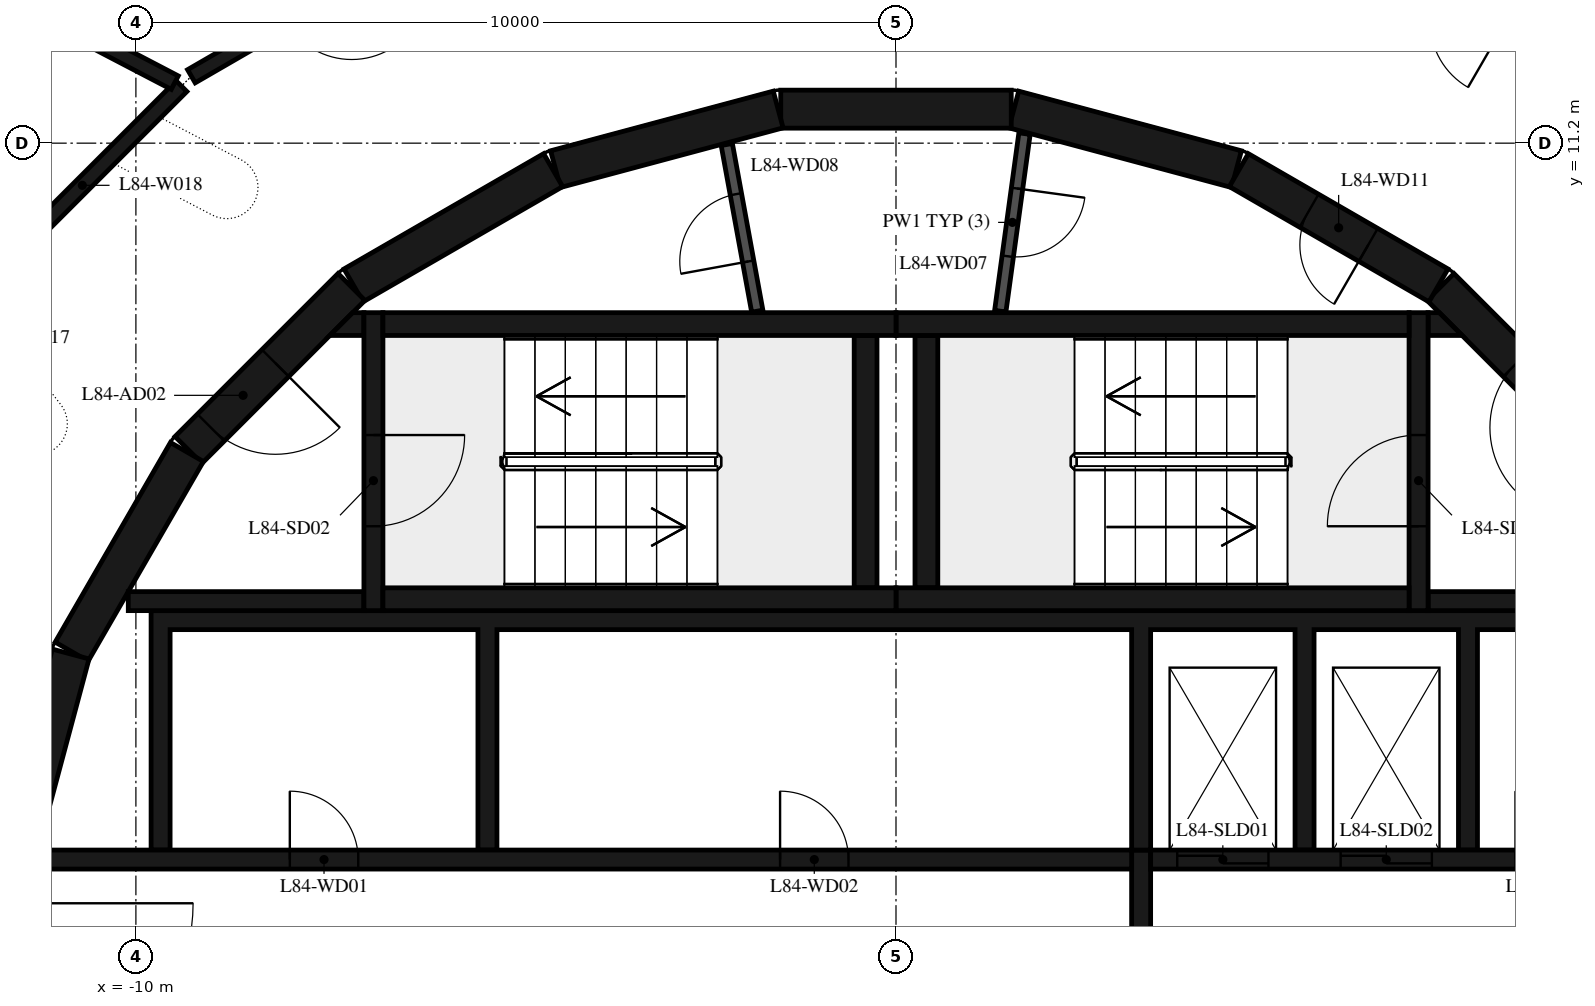
"""IFC4 building model, lengths in metres.
Left out: names, types, materials, properties, quantities, classifications, styles, units other than length and angle.
Written with IfcOpenShell. Run it as: python <this file> out.ifc"""

import sys

from ifc_helpers import new_model, si_unit, direction, frame, frame_2d, origin, place, context, subcontext, project, spatial, polyline, rectangle, outline, extrude, element, fill, save


model = new_model("IFC4")
c1 = context("Model", 3, precision=1e-05, world=origin(), true_north=direction((0.0, 1.0)))
c2 = subcontext(c1, "Body", "Model", "MODEL_VIEW")
j1 = project(units=[si_unit("LENGTHUNIT", "METRE"), si_unit("PLANEANGLEUNIT", "RADIAN")], contexts=[c1])
p1 = place(None, origin())
s1 = spatial("IfcSite", under=j1, at=p1, CompositionType="ELEMENT")
p2 = place(p1, origin())
s2 = spatial("IfcBuilding", under=s1, at=p2, CompositionType="ELEMENT")
p3 = place(p2, frame((0.0, 0.0, 326.2)))
s3 = spatial("IfcBuildingStorey", under=s2, at=p3, CompositionType="ELEMENT", Elevation=326.2)
p4 = place(p3, frame((9.308, 7.164, 0.0), z_axis=(0.0, 0.0, 1.0), x_axis=(-0.707106781187, 0.707106781187, 0.0)))
e1 = element("IfcWall", 1, at=p4, inside=s3, PredefinedType="SHEAR", context=c2, shape_type="SweptSolid", body=[
    extrude(rectangle(XDim=3.032, YDim=0.5, at=frame_2d((1.516, 0.0))), origin(), (0.0, 0.0, 1.0), 6.35),
])
p5 = place(p4, frame((0.416, 0.0, 0.0)))
e2 = element("IfcOpeningElement", 2, at=p5, cuts=e1, PredefinedType="OPENING", context=c2, shape_type="SweptSolid", body=[
    extrude(rectangle(XDim=1.2, YDim=2.1, at=frame_2d((0.6, 1.05))), frame((0.0, 0.26, 0.0), z_axis=(0.0, -1.0, 0.0), x_axis=(1.0, 0.0, 0.0)), (0.0, 0.0, 1.0), 0.52),
])
p6 = place(p3, frame((7.137, 9.329, 0.0), z_axis=(0.0, 0.0, 1.0), x_axis=(-0.865975092491, 0.500087131594, 0.0)))
e3 = element("IfcWall", 3, at=p6, inside=s3, PredefinedType="SHEAR", context=c2, shape_type="SweptSolid", body=[
    extrude(rectangle(XDim=3.033, YDim=0.5, at=frame_2d((1.516, 0.0))), origin(), (0.0, 0.0, 1.0), 6.35),
])
p7 = place(p6, frame((1.066, 0.0, 0.0)))
e4 = element("IfcOpeningElement", 4, at=p7, cuts=e3, PredefinedType="OPENING", context=c2, shape_type="SweptSolid", body=[
    extrude(rectangle(XDim=0.9, YDim=2.1, at=frame_2d((0.45, 1.05))), frame((0.0, 0.26, 0.0), z_axis=(0.0, -1.0, 0.0), x_axis=(1.0, 0.0, 0.0)), (0.0, 0.0, 1.0), 0.52),
])
for number, where, z_axis, x_axis in (
    (5, (4.479, 10.858, 0.0), (0.0, 0.0, 1.0), (-0.966, 0.259, 0.0)),
    (6, (1.516, 11.647, 0.0), (0.0, 0.0, 1.0), (-1.0, 0.0, 0.0)),
    (7, (-1.55, 11.643, 0.0), (0.0, 0.0, 1.0), (-0.966, -0.259, 0.0)),
    (8, (-4.51, 10.845, 0.0), (0.0, 0.0, 1.0), (-0.866, -0.5, 0.0)),
):
    element("IfcWall", number, at=place(p3, frame(where, z_axis=z_axis, x_axis=x_axis)), inside=s3, PredefinedType="SHEAR", context=c2, shape_type="SweptSolid", body=[
        extrude(rectangle(XDim=3.033, YDim=0.5, at=frame_2d((1.516, 0.0))), origin(), (0.0, 0.0, 1.0), 6.35),
    ])
p8 = place(p3, frame((-7.164, 9.308, 0.0), z_axis=(0.0, 0.0, 1.0), x_axis=(-0.707106781187, -0.707106781187, 0.0)))
e9 = element("IfcWall", 9, at=p8, inside=s3, PredefinedType="SHEAR", context=c2, shape_type="SweptSolid", body=[
    extrude(rectangle(XDim=3.032, YDim=0.5, at=frame_2d((1.516, 0.0))), origin(), (0.0, 0.0, 1.0), 6.35),
])
p9 = place(p8, frame((1.416, 0.0, 0.0)))
e10 = element("IfcOpeningElement", 10, at=p9, cuts=e9, PredefinedType="OPENING", context=c2, shape_type="SweptSolid", body=[
    extrude(rectangle(XDim=1.2, YDim=2.1, at=frame_2d((0.6, 1.05))), frame((0.0, 0.26, 0.0), z_axis=(0.0, -1.0, 0.0), x_axis=(1.0, 0.0, 0.0)), (0.0, 0.0, 1.0), 0.52),
])
for number, where, z_axis, x_axis in (
    (11, (-9.329, 7.137, 0.0), (0.0, 0.0, 1.0), (-0.5, -0.866, 0.0)),
    (12, (-10.858, 4.479, 0.0), (0.0, 0.0, 1.0), (-0.259, -0.966, 0.0)),
):
    element("IfcWall", number, at=place(p3, frame(where, z_axis=z_axis, x_axis=x_axis)), inside=s3, PredefinedType="SHEAR", context=c2, shape_type="SweptSolid", body=[
        extrude(rectangle(XDim=3.033, YDim=0.5, at=frame_2d((1.516, 0.0))), origin(), (0.0, 0.0, 1.0), 6.35),
    ])
for number, where, z_axis, x_axis in (
    (13, (0.0, 5.2, 0.0), (0.0, 0.0, 1.0), (1.0, 0.0, 0.0)),
    (14, (0.0, 8.82, 0.0), (0.0, 0.0, 1.0), (1.0, 0.0, 0.0)),
):
    element("IfcWall", number, at=place(p3, frame(where, z_axis=z_axis, x_axis=x_axis)), inside=s3, PredefinedType="SHEAR", context=c2, shape_type="SweptSolid", body=[
        extrude(rectangle(XDim=6.75, YDim=0.3, at=frame_2d((3.375, 0.0))), origin(), (0.0, 0.0, 1.0), 6.35),
    ])
p10 = place(p3, frame((0.4, 5.35, 0.0), z_axis=(0.0, 0.0, 1.0), x_axis=(0.0, 1.0, 0.0)))
e15 = element("IfcWall", 15, at=p10, inside=s3, PredefinedType="SHEAR", context=c2, shape_type="SweptSolid", body=[
    extrude(rectangle(XDim=3.32, YDim=0.3, at=frame_2d((1.66, 0.0))), origin(), (0.0, 0.0, 1.0), 6.35),
])
p11 = place(p3, frame((6.875, 5.05, 0.0), z_axis=(0.0, 0.0, 1.0), x_axis=(0.0, 1.0, 0.0)))
e16 = element("IfcWall", 16, at=p11, inside=s3, PredefinedType="SHEAR", context=c2, shape_type="SweptSolid", body=[
    extrude(rectangle(XDim=3.92, YDim=0.25, at=frame_2d((1.96, 0.0))), origin(), (0.0, 0.0, 1.0), 6.35),
])
p12 = place(p11, frame((1.11, 0.0, 0.0)))
e17 = element("IfcOpeningElement", 17, at=p12, cuts=e16, PredefinedType="OPENING", context=c2, shape_type="SweptSolid", body=[
    extrude(rectangle(XDim=1.2, YDim=2.1, at=frame_2d((0.6, 1.05))), frame((0.0, 0.135, 0.0), z_axis=(0.0, -1.0, 0.0), x_axis=(1.0, 0.0, 0.0)), (0.0, 0.0, 1.0), 0.27),
])
p13 = place(p3, frame((7.0, 5.175, 0.0), z_axis=(0.0, 0.0, 1.0), x_axis=(1.0, 0.0, 0.0)))
e18 = element("IfcWall", 18, at=p13, inside=s3, PredefinedType="SHEAR", context=c2, shape_type="SweptSolid", body=[
    extrude(rectangle(XDim=3.1, YDim=0.25, at=frame_2d((1.55, 0.0))), origin(), (0.0, 0.0, 1.0), 6.35),
])
p14 = place(p3, origin())
e19 = element("IfcWall", 19, at=p14, inside=s3, PredefinedType="SHEAR", context=c2, shape_type="SweptSolid", body=[
    extrude(outline(polyline([(7.448, 8.67), (7.0, 8.67), (7.0, 8.97), (7.148, 8.97), (7.448, 8.67)])), origin(), (0.0, 0.0, 1.0), 6.35),
])
for number, where, z_axis, x_axis in (
    (20, (-6.75, 5.2, 0.0), (0.0, 0.0, 1.0), (1.0, 0.0, 0.0)),
    (21, (-6.75, 8.82, 0.0), (0.0, 0.0, 1.0), (1.0, 0.0, 0.0)),
):
    element("IfcWall", number, at=place(p3, frame(where, z_axis=z_axis, x_axis=x_axis)), inside=s3, PredefinedType="SHEAR", context=c2, shape_type="SweptSolid", body=[
        extrude(rectangle(XDim=6.75, YDim=0.3, at=frame_2d((3.375, 0.0))), origin(), (0.0, 0.0, 1.0), 6.35),
    ])
p15 = place(p3, frame((-0.4, 5.35, 0.0), z_axis=(0.0, 0.0, 1.0), x_axis=(0.0, 1.0, 0.0)))
e22 = element("IfcWall", 22, at=p15, inside=s3, PredefinedType="SHEAR", context=c2, shape_type="SweptSolid", body=[
    extrude(rectangle(XDim=3.32, YDim=0.3, at=frame_2d((1.66, 0.0))), origin(), (0.0, 0.0, 1.0), 6.35),
])
p16 = place(p3, frame((-6.875, 8.97, 0.0), z_axis=(0.0, 0.0, 1.0), x_axis=(0.0, -1.0, 0.0)))
e23 = element("IfcWall", 23, at=p16, inside=s3, PredefinedType="SHEAR", context=c2, shape_type="SweptSolid", body=[
    extrude(rectangle(XDim=3.92, YDim=0.25, at=frame_2d((1.96, 0.0))), origin(), (0.0, 0.0, 1.0), 6.35),
])
p17 = place(p16, frame((1.61, 0.0, 0.0)))
e24 = element("IfcOpeningElement", 24, at=p17, cuts=e23, PredefinedType="OPENING", context=c2, shape_type="SweptSolid", body=[
    extrude(rectangle(XDim=1.2, YDim=2.1, at=frame_2d((0.6, 1.05))), frame((0.0, 0.135, 0.0), z_axis=(0.0, -1.0, 0.0), x_axis=(1.0, 0.0, 0.0)), (0.0, 0.0, 1.0), 0.27),
])
p18 = place(p3, frame((-7.0, 5.175, 0.0), z_axis=(0.0, 0.0, 1.0), x_axis=(-1.0, 0.0, 0.0)))
e25 = element("IfcWall", 25, at=p18, inside=s3, PredefinedType="SHEAR", context=c2, shape_type="SweptSolid", body=[
    extrude(rectangle(XDim=3.1, YDim=0.25, at=frame_2d((1.55, 0.0))), origin(), (0.0, 0.0, 1.0), 6.35),
])
p19 = place(p3, origin())
e26 = element("IfcWall", 26, at=p19, inside=s3, PredefinedType="SHEAR", context=c2, shape_type="SweptSolid", body=[
    extrude(outline(polyline([(-7.148, 8.97), (-7.0, 8.97), (-7.0, 8.67), (-7.448, 8.67), (-7.148, 8.97)])), origin(), (0.0, 0.0, 1.0), 6.35),
])
p20 = place(p3, origin())
e27 = element("IfcWall", 27, at=p20, inside=s3, PredefinedType="SHEAR", context=c2, shape_type="SweptSolid", body=[
    extrude(outline(polyline([(-9.8, 1.9), (-9.55, 1.9), (-9.55, 4.8), (-5.5, 4.8), (-5.5, 1.9), (-5.25, 1.9), (-5.25, 4.8), (3.1, 4.8), (3.1, 1.9), (3.35, 1.9), (3.35, 4.8), (5.25, 4.8), (5.25, 1.9), (5.5, 1.9), (5.5, 4.8), (7.4, 4.8), (7.4, 1.9), (7.65, 1.9), (7.65, 4.8), (9.55, 4.8), (9.55, 1.9), (9.8, 1.9), (9.8, 4.8), (9.8, 5.05), (-9.8, 5.05), (-9.8, 4.8), (-9.8, 1.9)])), origin(), (0.0, 0.0, 1.0), 6.35),
])
p21 = place(p3, frame((-11.28, 1.775, 0.0), z_axis=(0.0, 0.0, 1.0), x_axis=(1.0, 0.0, 0.0)))
e28 = element("IfcWall", 28, at=p21, inside=s3, PredefinedType="SHEAR", context=c2, shape_type="SweptSolid", body=[
    extrude(rectangle(XDim=14.38, YDim=0.25, at=frame_2d((7.19, 0.0))), origin(), (0.0, 0.0, 1.0), 6.35),
])
p22 = place(p21, frame((3.305, 0.0, 0.0)))
e29 = element("IfcOpeningElement", 29, at=p22, cuts=e28, PredefinedType="OPENING", context=c2, shape_type="SweptSolid", body=[
    extrude(rectangle(XDim=0.9, YDim=2.1, at=frame_2d((0.45, 1.05))), frame((0.0, 0.135, 0.0), z_axis=(0.0, -1.0, 0.0), x_axis=(1.0, 0.0, 0.0)), (0.0, 0.0, 1.0), 0.27),
])
p23 = place(p21, frame((9.755, 0.0, 0.0)))
e30 = element("IfcOpeningElement", 30, at=p23, cuts=e28, PredefinedType="OPENING", context=c2, shape_type="SweptSolid", body=[
    extrude(rectangle(XDim=0.9, YDim=2.1, at=frame_2d((0.45, 1.05))), frame((0.0, 0.135, 0.0), z_axis=(0.0, -1.0, 0.0), x_axis=(1.0, 0.0, 0.0)), (0.0, 0.0, 1.0), 0.27),
])
p24 = place(p3, frame((3.35, 1.775, 0.0), z_axis=(0.0, 0.0, 1.0), x_axis=(1.0, 0.0, 0.0)))
e31 = element("IfcWall", 31, at=p24, inside=s3, PredefinedType="SHEAR", context=c2, shape_type="SweptSolid", body=[
    extrude(rectangle(XDim=7.93, YDim=0.25, at=frame_2d((3.965, 0.0))), origin(), (0.0, 0.0, 1.0), 6.35),
])
p25 = place(p24, frame((0.35, 0.0, 0.0)))
e32 = element("IfcOpeningElement", 32, at=p25, cuts=e31, PredefinedType="OPENING", context=c2, shape_type="SweptSolid", body=[
    extrude(rectangle(XDim=1.2, YDim=2.4, at=frame_2d((0.6, 1.2))), frame((0.0, 0.135, 0.0), z_axis=(0.0, -1.0, 0.0), x_axis=(1.0, 0.0, 0.0)), (0.0, 0.0, 1.0), 0.27),
])
p26 = place(p24, frame((2.5, 0.0, 0.0)))
e33 = element("IfcOpeningElement", 33, at=p26, cuts=e31, PredefinedType="OPENING", context=c2, shape_type="SweptSolid", body=[
    extrude(rectangle(XDim=1.2, YDim=2.4, at=frame_2d((0.6, 1.2))), frame((0.0, 0.135, 0.0), z_axis=(0.0, -1.0, 0.0), x_axis=(1.0, 0.0, 0.0)), (0.0, 0.0, 1.0), 0.27),
])
p27 = place(p24, frame((4.8, 0.0, 0.0)))
e34 = element("IfcOpeningElement", 34, at=p27, cuts=e31, PredefinedType="OPENING", context=c2, shape_type="SweptSolid", body=[
    extrude(rectangle(XDim=0.9, YDim=2.1, at=frame_2d((0.45, 1.05))), frame((0.0, 0.135, 0.0), z_axis=(0.0, -1.0, 0.0), x_axis=(1.0, 0.0, 0.0)), (0.0, 0.0, 1.0), 0.27),
])
p28 = place(p3, frame((3.225, -1.9, 0.0), z_axis=(0.0, 0.0, 1.0), x_axis=(0.0, 1.0, 0.0)))
e35 = element("IfcWall", 35, at=p28, inside=s3, PredefinedType="SHEAR", context=c2, shape_type="SweptSolid", body=[
    extrude(rectangle(XDim=3.8, YDim=0.25, at=frame_2d((1.9, 0.0))), origin(), (0.0, 0.0, 1.0), 6.35),
])
p29 = place(p3, frame((1.691, 11.326, 0.0), z_axis=(0.0, 0.0, 1.0), x_axis=(-0.135344253201, -0.990798633994, 0.0)))
e36 = element("IfcWall", 36, at=p29, inside=s3, PredefinedType="PARTITIONING", context=c2, shape_type="SweptSolid", body=[
    extrude(rectangle(XDim=2.358, YDim=0.15, at=frame_2d((1.179, 0.0))), origin(), (0.0, 0.0, 1.0), 6.35),
])
p30 = place(p29, frame((0.729, 0.0, 0.0)))
e37 = element("IfcOpeningElement", 37, at=p30, cuts=e36, PredefinedType="OPENING", context=c2, shape_type="SweptSolid", body=[
    extrude(rectangle(XDim=0.9, YDim=2.1, at=frame_2d((0.45, 1.05))), frame((0.0, 0.085, 0.0), z_axis=(0.0, -1.0, 0.0), x_axis=(1.0, 0.0, 0.0)), (0.0, 0.0, 1.0), 0.17),
])
p31 = place(p3, frame((-1.825, 8.99, 0.0), z_axis=(0.0, 0.0, 1.0), x_axis=(-0.179955206115, 0.983674805915, 0.0)))
e38 = element("IfcWall", 38, at=p31, inside=s3, PredefinedType="PARTITIONING", context=c2, shape_type="SweptSolid", body=[
    extrude(rectangle(XDim=2.229, YDim=0.15, at=frame_2d((1.115, 0.0))), origin(), (0.0, 0.0, 1.0), 6.35),
])
p32 = place(p31, frame((0.665, 0.0, 0.0)))
e39 = element("IfcOpeningElement", 39, at=p32, cuts=e38, PredefinedType="OPENING", context=c2, shape_type="SweptSolid", body=[
    extrude(rectangle(XDim=0.9, YDim=2.1, at=frame_2d((0.45, 1.05))), frame((0.0, 0.085, 0.0), z_axis=(0.0, -1.0, 0.0), x_axis=(1.0, 0.0, 0.0)), (0.0, 0.0, 1.0), 0.17),
])
p33 = place(p3, frame((-12.009, 9.341, 0.0), z_axis=(0.0, 0.0, 1.0), x_axis=(0.707139861432, 0.707073699394, 0.0)))
e40 = element("IfcWall", 40, at=p33, inside=s3, PredefinedType="PARTITIONING", context=c2, shape_type="SweptSolid", body=[
    extrude(rectangle(XDim=3.69, YDim=0.2, at=frame_2d((1.845, 0.0))), origin(), (0.0, 0.0, 1.0), 6.35),
])
p34 = place(p3, frame((-9.489, 11.996, 0.0), z_axis=(0.0, 0.0, 1.0), x_axis=(-0.886536984928, 0.462657729163, 0.0)))
e41 = element("IfcWall", 41, at=p34, inside=s3, PredefinedType="PARTITIONING", context=c2, shape_type="SweptSolid", body=[
    extrude(rectangle(XDim=2.638, YDim=0.2, at=frame_2d((1.319, 0.0))), origin(), (0.0, 0.0, 1.0), 6.35),
])
p35 = place(p3, frame((-5.917, 14.02, 0.0), z_axis=(0.0, 0.0, 1.0), x_axis=(-0.865601686425, -0.500733182901, 0.0)))
e42 = element("IfcWall", 42, at=p35, inside=s3, PredefinedType="PARTITIONING", context=c2, shape_type="SweptSolid", body=[
    extrude(rectangle(XDim=3.874, YDim=0.2, at=frame_2d((1.937, 0.0))), origin(), (0.0, 0.0, 1.0), 6.35),
])
p36 = place(p35, frame((1.437, 0.0, 0.0)))
e43 = element("IfcOpeningElement", 43, at=p36, cuts=e42, PredefinedType="OPENING", context=c2, shape_type="SweptSolid", body=[
    extrude(rectangle(XDim=1.0, YDim=2.1, at=frame_2d((0.5, 1.05))), frame((0.0, 0.11, 0.0), z_axis=(0.0, -1.0, 0.0), x_axis=(1.0, 0.0, 0.0)), (0.0, 0.0, 1.0), 0.22),
])
p37 = place(p3, frame((9.27, 12.08, 0.0), z_axis=(0.0, 0.0, 1.0), x_axis=(-0.865601686425, 0.500733182901, 0.0)))
e44 = element("IfcWall", 44, at=p37, inside=s3, PredefinedType="PARTITIONING", context=c2, shape_type="SweptSolid", body=[
    extrude(rectangle(XDim=3.874, YDim=0.2, at=frame_2d((1.937, 0.0))), origin(), (0.0, 0.0, 1.0), 6.35),
])
p38 = place(p37, frame((1.437, 0.0, 0.0)))
e45 = element("IfcOpeningElement", 45, at=p38, cuts=e44, PredefinedType="OPENING", context=c2, shape_type="SweptSolid", body=[
    extrude(rectangle(XDim=1.0, YDim=2.1, at=frame_2d((0.5, 1.05))), frame((0.0, 0.11, 0.0), z_axis=(0.0, -1.0, 0.0), x_axis=(1.0, 0.0, 0.0)), (0.0, 0.0, 1.0), 0.22),
])
p39 = place(p12, origin())
e46 = element("IfcDoor", 46, at=p39, inside=s3, OperationType="SINGLE_SWING_LEFT", PredefinedType="DOOR", context=c2, shape_type="SweptSolid", body=[
    extrude(rectangle(XDim=1.2, YDim=2.1, at=frame_2d((0.6, 1.05))), frame((0.0, 0.025, 0.0), z_axis=(0.0, -1.0, 0.0), x_axis=(1.0, 0.0, 0.0)), (0.0, 0.0, 1.0), 0.05),
])
fill(e17, e46)
p40 = place(p5, origin())
e47 = element("IfcDoor", 47, at=p40, inside=s3, OperationType="SINGLE_SWING_RIGHT", PredefinedType="DOOR", context=c2, shape_type="SweptSolid", body=[
    extrude(rectangle(XDim=1.2, YDim=2.1, at=frame_2d((0.6, 1.05))), frame((0.0, 0.025, 0.0), z_axis=(0.0, -1.0, 0.0), x_axis=(1.0, 0.0, 0.0)), (0.0, 0.0, 1.0), 0.05),
])
fill(e2, e47)
p41 = place(p17, origin())
e48 = element("IfcDoor", 48, at=p41, inside=s3, OperationType="SINGLE_SWING_LEFT", PredefinedType="DOOR", context=c2, shape_type="SweptSolid", body=[
    extrude(rectangle(XDim=1.2, YDim=2.1, at=frame_2d((0.6, 1.05))), frame((0.0, 0.025, 0.0), z_axis=(0.0, -1.0, 0.0), x_axis=(1.0, 0.0, 0.0)), (0.0, 0.0, 1.0), 0.05),
])
fill(e24, e48)
p42 = place(p9, origin())
e49 = element("IfcDoor", 49, at=p42, inside=s3, OperationType="SINGLE_SWING_RIGHT", PredefinedType="DOOR", context=c2, shape_type="SweptSolid", body=[
    extrude(rectangle(XDim=1.2, YDim=2.1, at=frame_2d((0.6, 1.05))), frame((0.0, 0.025, 0.0), z_axis=(0.0, -1.0, 0.0), x_axis=(1.0, 0.0, 0.0)), (0.0, 0.0, 1.0), 0.05),
])
fill(e10, e49)
p43 = place(p25, origin())
e50 = element("IfcDoor", 50, at=p43, inside=s3, OperationType="DOUBLE_DOOR_SLIDING", PredefinedType="DOOR", context=c2, shape_type="SweptSolid", body=[
    extrude(rectangle(XDim=1.2, YDim=2.4, at=frame_2d((0.6, 1.2))), frame((0.0, 0.025, 0.0), z_axis=(0.0, -1.0, 0.0), x_axis=(1.0, 0.0, 0.0)), (0.0, 0.0, 1.0), 0.05),
])
fill(e32, e50)
p44 = place(p26, origin())
e51 = element("IfcDoor", 51, at=p44, inside=s3, OperationType="DOUBLE_DOOR_SLIDING", PredefinedType="DOOR", context=c2, shape_type="SweptSolid", body=[
    extrude(rectangle(XDim=1.2, YDim=2.4, at=frame_2d((0.6, 1.2))), frame((0.0, 0.025, 0.0), z_axis=(0.0, -1.0, 0.0), x_axis=(1.0, 0.0, 0.0)), (0.0, 0.0, 1.0), 0.05),
])
fill(e33, e51)
p45 = place(p22, origin())
e52 = element("IfcDoor", 52, at=p45, inside=s3, OperationType="SINGLE_SWING_LEFT", PredefinedType="DOOR", context=c2, shape_type="SweptSolid", body=[
    extrude(rectangle(XDim=0.9, YDim=2.1, at=frame_2d((0.45, 1.05))), frame((0.0, 0.025, 0.0), z_axis=(0.0, -1.0, 0.0), x_axis=(1.0, 0.0, 0.0)), (0.0, 0.0, 1.0), 0.05),
])
fill(e29, e52)
p46 = place(p23, origin())
e53 = element("IfcDoor", 53, at=p46, inside=s3, OperationType="SINGLE_SWING_RIGHT", PredefinedType="DOOR", context=c2, shape_type="SweptSolid", body=[
    extrude(rectangle(XDim=0.9, YDim=2.1, at=frame_2d((0.45, 1.05))), frame((0.0, 0.025, 0.0), z_axis=(0.0, -1.0, 0.0), x_axis=(1.0, 0.0, 0.0)), (0.0, 0.0, 1.0), 0.05),
])
fill(e30, e53)
p47 = place(p30, origin())
e54 = element("IfcDoor", 54, at=p47, inside=s3, OperationType="SINGLE_SWING_LEFT", PredefinedType="DOOR", context=c2, shape_type="SweptSolid", body=[
    extrude(rectangle(XDim=0.9, YDim=2.1, at=frame_2d((0.45, 1.05))), frame((0.0, 0.025, 0.0), z_axis=(0.0, -1.0, 0.0), x_axis=(1.0, 0.0, 0.0)), (0.0, 0.0, 1.0), 0.05),
])
fill(e37, e54)
p48 = place(p32, origin())
e55 = element("IfcDoor", 55, at=p48, inside=s3, OperationType="SINGLE_SWING_RIGHT", PredefinedType="DOOR", context=c2, shape_type="SweptSolid", body=[
    extrude(rectangle(XDim=0.9, YDim=2.1, at=frame_2d((0.45, 1.05))), frame((0.0, 0.025, 0.0), z_axis=(0.0, -1.0, 0.0), x_axis=(1.0, 0.0, 0.0)), (0.0, 0.0, 1.0), 0.05),
])
fill(e39, e55)
p49 = place(p7, origin())
e56 = element("IfcDoor", 56, at=p49, inside=s3, OperationType="SINGLE_SWING_LEFT", PredefinedType="DOOR", context=c2, shape_type="SweptSolid", body=[
    extrude(rectangle(XDim=0.9, YDim=2.1, at=frame_2d((0.45, 1.05))), frame((0.0, 0.025, 0.0), z_axis=(0.0, -1.0, 0.0), x_axis=(1.0, 0.0, 0.0)), (0.0, 0.0, 1.0), 0.05),
])
fill(e4, e56)
save(model, sys.argv[1])
